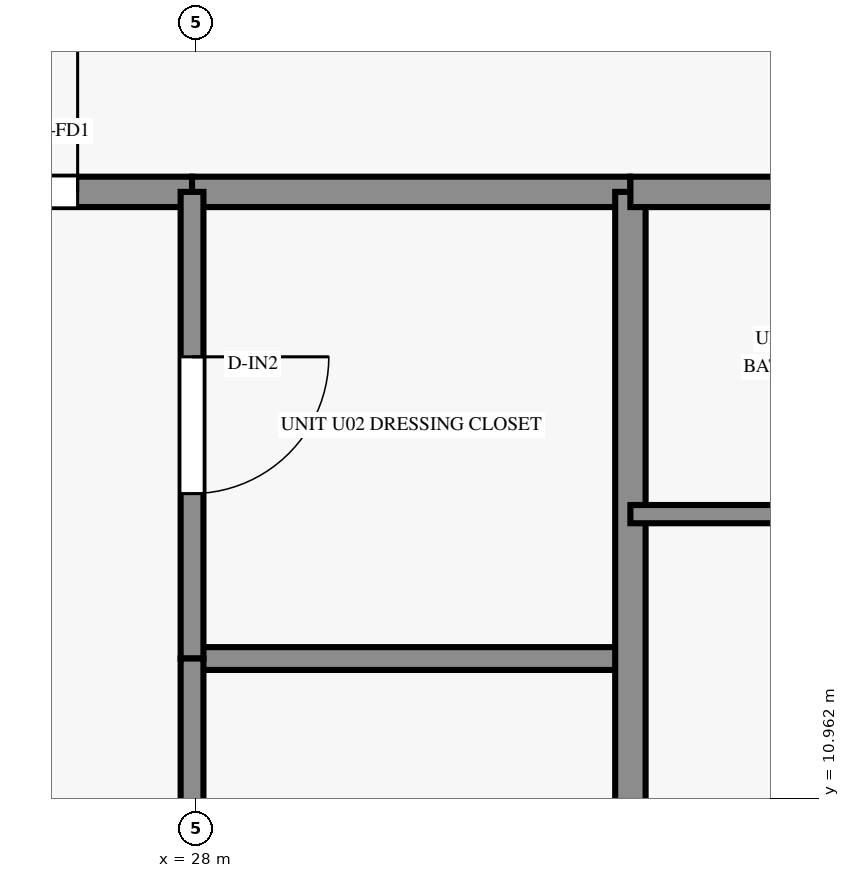
"""IFC4 building model, lengths in metres.
Left out: names, types, materials, properties, quantities, classifications, styles, units other than length and angle.
Written with IfcOpenShell. Run it as: python <this file> out.ifc"""

import sys

from ifc_helpers import new_model, si_unit, direction, frame, frame_2d, origin, place, context, subcontext, project, spatial, rectangle, extrude, source, transform, mapped, element, fill, save


model = new_model("IFC4")
c1 = context("Model", 3, precision=1e-05, world=origin(), true_north=direction((0.0, 1.0)))
c2 = subcontext(c1, "Body", "Model", "MODEL_VIEW")
j1 = project(units=[si_unit("LENGTHUNIT", "METRE"), si_unit("PLANEANGLEUNIT", "RADIAN")], contexts=[c1])
p1 = place(None, origin())
s1 = spatial("IfcSite", under=j1, at=p1, CompositionType="ELEMENT")
p2 = place(p1, origin())
s2 = spatial("IfcBuilding", under=s1, at=p2, CompositionType="ELEMENT")
p3 = place(p2, frame((0.0, 0.0, 19.4)))
s3 = spatial("IfcBuildingStorey", under=s2, at=p3, CompositionType="ELEMENT", Elevation=19.4)
p4 = place(p3, frame((25.469, 14.95, 0.0), z_axis=(0.0, 0.0, 1.0), x_axis=(1.0, 0.0, 0.0)))
e1 = element("IfcWall", 1, at=p4, inside=s3, PredefinedType="PARTITIONING", context=c2, shape_type="SweptSolid", body=[
    extrude(rectangle(XDim=2.505, YDim=0.2, at=frame_2d((1.252, 0.0))), origin(), (0.0, 0.0, 1.0), 2.79),
])
p5 = place(p4, frame((0.752, 0.0, 0.0)))
e2 = element("IfcOpeningElement", 2, at=p5, cuts=e1, PredefinedType="OPENING", context=c2, shape_type="SweptSolid", body=[
    extrude(rectangle(XDim=1.0, YDim=2.15, at=frame_2d((0.5, 1.075))), frame((0.0, 0.112, 0.0), z_axis=(0.0, -1.0, 0.0), x_axis=(1.0, 0.0, 0.0)), (0.0, 0.0, 1.0), 0.224),
])
p6 = place(p3, frame((27.974, 14.95, 0.0), z_axis=(0.0, 0.0, 1.0), x_axis=(1.0, 0.0, 0.0)))
e3 = element("IfcWall", 3, at=p6, inside=s3, PredefinedType="PARTITIONING", context=c2, shape_type="SweptSolid", body=[
    extrude(rectangle(XDim=2.884, YDim=0.2, at=frame_2d((1.442, 0.0))), origin(), (0.0, 0.0, 1.0), 2.79),
])
p7 = place(p3, frame((27.974, 11.88, 0.0), z_axis=(0.0, 0.0, 1.0), x_axis=(1.0, 0.0, 0.0)))
e4 = element("IfcWall", 4, at=p7, inside=s3, PredefinedType="PARTITIONING", context=c2, shape_type="SweptSolid", body=[
    extrude(rectangle(XDim=2.884, YDim=0.15, at=frame_2d((1.442, 0.0))), origin(), (0.0, 0.0, 1.0), 2.79),
])
p8 = place(p3, frame((27.974, 14.95, 0.0), z_axis=(0.0, 0.0, 1.0), x_axis=(0.0, -1.0, 0.0)))
e5 = element("IfcWall", 5, at=p8, inside=s3, PredefinedType="PARTITIONING", context=c2, shape_type="SweptSolid", body=[
    extrude(rectangle(XDim=3.07, YDim=0.15, at=frame_2d((1.535, 0.0))), origin(), (0.0, 0.0, 1.0), 2.79),
])
p9 = place(p8, frame((1.085, 0.0, 0.0)))
e6 = element("IfcOpeningElement", 6, at=p9, cuts=e5, PredefinedType="OPENING", context=c2, shape_type="SweptSolid", body=[
    extrude(rectangle(XDim=0.9, YDim=2.1, at=frame_2d((0.45, 1.05))), frame((0.0, 0.087, 0.0), z_axis=(0.0, -1.0, 0.0), x_axis=(1.0, 0.0, 0.0)), (0.0, 0.0, 1.0), 0.174),
])
p10 = place(p3, frame((27.974, 11.88, 0.0), z_axis=(0.0, 0.0, 1.0), x_axis=(0.0, -1.0, 0.0)))
e7 = element("IfcWall", 7, at=p10, inside=s3, PredefinedType="PARTITIONING", context=c2, shape_type="SweptSolid", body=[
    extrude(rectangle(XDim=8.73, YDim=0.15, at=frame_2d((4.365, 0.0))), origin(), (0.0, 0.0, 1.0), 2.79),
])
p11 = place(p10, frame((3.609, 0.0, 0.0)))
e8 = element("IfcOpeningElement", 8, at=p11, cuts=e7, PredefinedType="OPENING", context=c2, shape_type="SweptSolid", body=[
    extrude(rectangle(XDim=0.9, YDim=2.1, at=frame_2d((0.45, 1.05))), frame((0.0, 0.087, 0.0), z_axis=(0.0, -1.0, 0.0), x_axis=(1.0, 0.0, 0.0)), (0.0, 0.0, 1.0), 0.174),
])
p12 = place(p3, frame((30.858, 14.95, 0.0), z_axis=(0.0, 0.0, 1.0), x_axis=(0.0, -1.0, 0.0)))
e9 = element("IfcWall", 9, at=p12, inside=s3, PredefinedType="PARTITIONING", context=c2, shape_type="SweptSolid", body=[
    extrude(rectangle(XDim=11.8, YDim=0.2, at=frame_2d((5.9, 0.0))), origin(), (0.0, 0.0, 1.0), 2.24),
])
p13 = place(p3, frame((30.858, 14.95, 0.0), z_axis=(0.0, 0.0, 1.0), x_axis=(1.0, 0.0, 0.0)))
e10 = element("IfcWall", 10, at=p13, inside=s3, PredefinedType="PARTITIONING", context=c2, shape_type="SweptSolid", body=[
    extrude(rectangle(XDim=2.2, YDim=0.2, at=frame_2d((1.1, 0.0))), origin(), (0.0, 0.0, 1.0), 2.79),
])
p14 = place(p3, frame((30.858, 12.83, 0.0), z_axis=(0.0, 0.0, 1.0), x_axis=(1.0, 0.0, 0.0)))
e11 = element("IfcWall", 11, at=p14, inside=s3, PredefinedType="PARTITIONING", context=c2, shape_type="SweptSolid", body=[
    extrude(rectangle(XDim=2.2, YDim=0.12, at=frame_2d((1.1, 0.0))), origin(), (0.0, 0.0, 1.0), 2.79),
])
m1 = source(origin(), c2, "Body", "SweptSolid", [
    extrude(rectangle(XDim=1.0, YDim=2.15, at=frame_2d((0.5, 1.075))), frame((0.0, 0.025, 0.0), z_axis=(0.0, -1.0, 0.0), x_axis=(1.0, 0.0, 0.0)), (0.0, 0.0, 1.0), 0.05),
])
p15 = place(p5, origin())
e12 = element("IfcDoor", 12, at=p15, inside=s3, OperationType="SINGLE_SWING_RIGHT", PredefinedType="DOOR", context=c2, shape_type="MappedRepresentation", body=[
    mapped(m1, transform((0.0, 0.0, 0.0), scale=1.0)),
])
fill(e2, e12)
m2 = source(origin(), c2, "Body", "SweptSolid", [
    extrude(rectangle(XDim=0.9, YDim=2.1, at=frame_2d((0.45, 1.05))), frame((0.0, 0.025, 0.0), z_axis=(0.0, -1.0, 0.0), x_axis=(1.0, 0.0, 0.0)), (0.0, 0.0, 1.0), 0.05),
])
p16 = place(p9, origin())
e13 = element("IfcDoor", 13, at=p16, inside=s3, OperationType="SINGLE_SWING_LEFT", PredefinedType="DOOR", context=c2, shape_type="MappedRepresentation", body=[
    mapped(m2, transform((0.0, 0.0, 0.0), scale=1.0)),
])
fill(e6, e13)
save(model, sys.argv[1])
